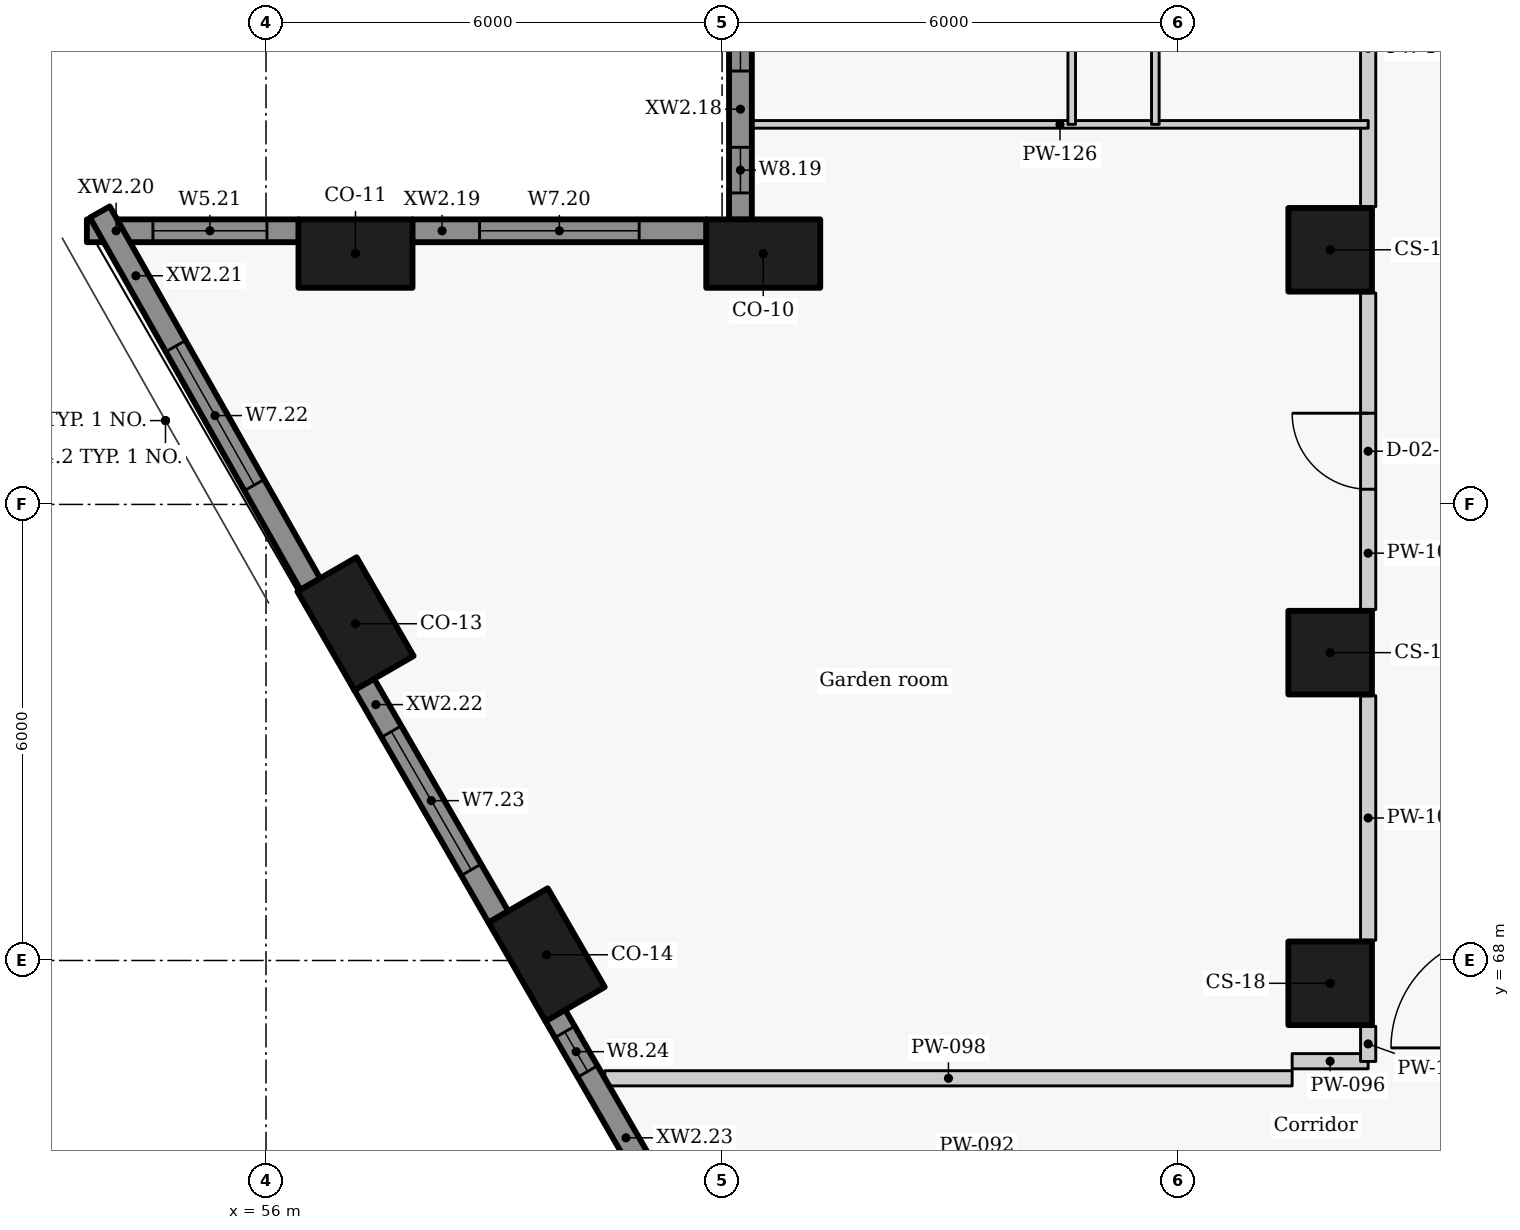
"""IFC4 building model, lengths in metres.
Left out: names, types, materials, properties, quantities, classifications, styles, units other than length and angle.
Written with IfcOpenShell. Run it as: python <this file> out.ifc"""

import sys

from ifc_helpers import new_model, si_unit, direction, frame, frame_2d, origin, origin_2d, place, context, subcontext, project, spatial, rectangle, extrude, element, fill, save


model = new_model("IFC4")
c1 = context("Model", 3, precision=1e-05, world=origin(), true_north=direction((0.0, 1.0)))
c2 = subcontext(c1, "Body", "Model", "MODEL_VIEW")
j1 = project(units=[si_unit("LENGTHUNIT", "METRE"), si_unit("PLANEANGLEUNIT", "RADIAN")], contexts=[c1])
p1 = place(None, origin())
s1 = spatial("IfcSite", under=j1, at=p1, CompositionType="ELEMENT")
p2 = place(p1, origin())
s2 = spatial("IfcBuilding", under=s1, at=p2, CompositionType="ELEMENT")
p3 = place(p2, frame((0.0, 0.0, 67.8)))
s3 = spatial("IfcBuildingStorey", under=s2, at=p3, CompositionType="ELEMENT", Elevation=67.8)
for number, where, z_axis, x_axis in (
    (1, (62.542, 77.3, 0.0), (0.0, 0.0, 1.0), (-1.0, 0.0, 0.0)),
    (2, (57.177, 77.3, 0.0), (0.0, 0.0, 1.0), (-1.0, 0.0, 0.0)),
    (3, (57.177, 72.43, 0.0), (0.0, 0.0, 1.0), (0.5, -0.866, 0.0)),
    (4, (59.692, 68.075, 0.0), (0.0, 0.0, 1.0), (0.5, -0.866, 0.0)),
):
    element("IfcColumn", number, at=place(p3, frame(where, z_axis=z_axis, x_axis=x_axis)), inside=s3, PredefinedType="COLUMN", context=c2, shape_type="SweptSolid", body=[
        extrude(rectangle(XDim=1.5, YDim=0.9, at=origin_2d()), origin(), (0.0, 0.0, 1.0), 3.3),
    ])
for number, where, z_axis, x_axis in (
    (5, (70.0, 77.35, 0.0), (0.0, 0.0, 1.0), (0.0, -1.0, 0.0)),
    (6, (70.0, 72.05, 0.0), (0.0, 0.0, 1.0), (0.0, -1.0, 0.0)),
    (7, (70.0, 67.7, 0.0), (0.0, 0.0, 1.0), (0.0, -1.0, 0.0)),
):
    element("IfcColumn", number, at=place(p3, frame(where, z_axis=z_axis, x_axis=x_axis)), inside=s3, PredefinedType="COLUMN", context=c2, shape_type="SweptSolid", body=[
        extrude(rectangle(XDim=1.1, YDim=1.1, at=origin_2d()), origin(), (0.0, 0.0, 1.0), 3.3),
    ])
p4 = place(p3, frame((62.242, 81.954, 0.0), z_axis=(0.0, 0.0, 1.0), x_axis=(0.0, -1.0, 0.0)))
e8 = element("IfcWall", 8, at=p4, inside=s3, PredefinedType="SOLIDWALL", context=c2, shape_type="SweptSolid", body=[
    extrude(rectangle(XDim=4.208, YDim=0.3, at=frame_2d((2.104, 0.0))), origin(), (0.0, 0.0, 1.0), 2.05),
])
p5 = place(p4, frame((0.752, 0.0, 0.9)))
e9 = element("IfcOpeningElement", 9, at=p5, cuts=e8, PredefinedType="OPENING", context=c2, shape_type="SweptSolid", body=[
    extrude(rectangle(XDim=1.5, YDim=1.1, at=frame_2d((0.75, 0.55))), frame((0.0, 0.16, 0.0), z_axis=(0.0, -1.0, 0.0), x_axis=(1.0, 0.0, 0.0)), (0.0, 0.0, 1.0), 0.32),
])
p6 = place(p4, frame((3.256, 0.0, 0.9)))
e10 = element("IfcOpeningElement", 10, at=p6, cuts=e8, PredefinedType="OPENING", context=c2, shape_type="SweptSolid", body=[
    extrude(rectangle(XDim=0.6, YDim=1.1, at=frame_2d((0.3, 0.55))), frame((0.0, 0.16, 0.0), z_axis=(0.0, -1.0, 0.0), x_axis=(1.0, 0.0, 0.0)), (0.0, 0.0, 1.0), 0.32),
])
p7 = place(p3, frame((61.796, 77.6, 0.0), z_axis=(0.0, 0.0, 1.0), x_axis=(-1.0, 0.0, 0.0)))
e11 = element("IfcWall", 11, at=p7, inside=s3, PredefinedType="SOLIDWALL", context=c2, shape_type="SweptSolid", body=[
    extrude(rectangle(XDim=3.873, YDim=0.3, at=frame_2d((1.936, 0.0))), origin(), (0.0, 0.0, 1.0), 2.05),
])
p8 = place(p7, frame((0.886, 0.0, 0.9)))
e12 = element("IfcOpeningElement", 12, at=p8, cuts=e11, PredefinedType="OPENING", context=c2, shape_type="SweptSolid", body=[
    extrude(rectangle(XDim=2.1, YDim=1.1, at=frame_2d((1.05, 0.55))), frame((0.0, 0.16, 0.0), z_axis=(0.0, -1.0, 0.0), x_axis=(1.0, 0.0, 0.0)), (0.0, 0.0, 1.0), 0.32),
])
p9 = place(p3, frame((56.431, 77.6, 0.0), z_axis=(0.0, 0.0, 1.0), x_axis=(-1.0, 0.0, 0.0)))
e13 = element("IfcWall", 13, at=p9, inside=s3, PredefinedType="SOLIDWALL", context=c2, shape_type="SweptSolid", body=[
    extrude(rectangle(XDim=2.788, YDim=0.3, at=frame_2d((1.394, 0.0))), origin(), (0.0, 0.0, 1.0), 2.05),
])
p10 = place(p9, frame((0.419, 0.0, 0.9)))
e14 = element("IfcOpeningElement", 14, at=p10, cuts=e13, PredefinedType="OPENING", context=c2, shape_type="SweptSolid", body=[
    extrude(rectangle(XDim=1.5, YDim=1.1, at=frame_2d((0.75, 0.55))), frame((0.0, 0.16, 0.0), z_axis=(0.0, -1.0, 0.0), x_axis=(1.0, 0.0, 0.0)), (0.0, 0.0, 1.0), 0.32),
])
p11 = place(p3, frame((53.814, 77.847, 0.0), z_axis=(0.0, 0.0, 1.0), x_axis=(0.492363204642, -0.870389840655, 0.0)))
e15 = element("IfcWall", 15, at=p11, inside=s3, PredefinedType="SOLIDWALL", context=c2, shape_type="SweptSolid", body=[
    extrude(rectangle(XDim=5.626, YDim=0.3, at=frame_2d((2.813, 0.0))), origin(), (0.0, 0.0, 1.0), 2.05),
])
p12 = place(p11, frame((2.026, 0.0, 0.9)))
e16 = element("IfcOpeningElement", 16, at=p12, cuts=e15, PredefinedType="OPENING", context=c2, shape_type="SweptSolid", body=[
    extrude(rectangle(XDim=2.1, YDim=1.1, at=frame_2d((1.05, 0.55))), frame((0.0, 0.16, 0.0), z_axis=(0.0, -1.0, 0.0), x_axis=(1.0, 0.0, 0.0)), (0.0, 0.0, 1.0), 0.32),
])
p13 = place(p3, frame((57.29, 71.634, 0.0), z_axis=(0.0, 0.0, 1.0), x_axis=(0.499977402622, -0.866038449993, 0.0)))
e17 = element("IfcWall", 17, at=p13, inside=s3, PredefinedType="SOLIDWALL", context=c2, shape_type="SweptSolid", body=[
    extrude(rectangle(XDim=3.537, YDim=0.3, at=frame_2d((1.769, 0.0))), origin(), (0.0, 0.0, 1.0), 2.05),
])
p14 = place(p13, frame((0.719, 0.0, 0.9)))
e18 = element("IfcOpeningElement", 18, at=p14, cuts=e17, PredefinedType="OPENING", context=c2, shape_type="SweptSolid", body=[
    extrude(rectangle(XDim=2.1, YDim=1.1, at=frame_2d((1.05, 0.55))), frame((0.0, 0.16, 0.0), z_axis=(0.0, -1.0, 0.0), x_axis=(1.0, 0.0, 0.0)), (0.0, 0.0, 1.0), 0.32),
])
p15 = place(p3, frame((59.805, 67.279, 0.0), z_axis=(0.0, 0.0, 1.0), x_axis=(0.500001735503, -0.866024401789, 0.0)))
e19 = element("IfcWall", 19, at=p15, inside=s3, PredefinedType="SOLIDWALL", context=c2, shape_type="SweptSolid", body=[
    extrude(rectangle(XDim=3.834, YDim=0.3, at=frame_2d((1.917, 0.0))), origin(), (0.0, 0.0, 1.0), 2.05),
])
p16 = place(p15, frame((0.253, 0.0, 0.9)))
e20 = element("IfcOpeningElement", 20, at=p16, cuts=e19, PredefinedType="OPENING", context=c2, shape_type="SweptSolid", body=[
    extrude(rectangle(XDim=0.6, YDim=1.1, at=frame_2d((0.3, 0.55))), frame((0.0, 0.16, 0.0), z_axis=(0.0, -1.0, 0.0), x_axis=(1.0, 0.0, 0.0)), (0.0, 0.0, 1.0), 0.32),
])
p17 = place(p15, frame((2.87, 0.0, 0.9)))
e21 = element("IfcOpeningElement", 21, at=p17, cuts=e19, PredefinedType="OPENING", context=c2, shape_type="SweptSolid", body=[
    extrude(rectangle(XDim=0.6, YDim=1.1, at=frame_2d((0.3, 0.55))), frame((0.0, 0.16, 0.0), z_axis=(0.0, -1.0, 0.0), x_axis=(1.0, 0.0, 0.0)), (0.0, 0.0, 1.0), 0.32),
])
p18 = place(p3, frame((69.5, 66.675, 0.0), z_axis=(0.0, 0.0, 1.0), x_axis=(1.0, 0.0, 0.0)))
e22 = element("IfcWall", 22, at=p18, inside=s3, PredefinedType="PARTITIONING", context=c2, shape_type="SweptSolid", body=[
    extrude(rectangle(XDim=1.0, YDim=0.2, at=frame_2d((0.5, 0.0))), origin(), (0.0, 0.0, 1.0), 2.43),
])
p19 = place(p3, frame((60.457, 66.45, 0.0), z_axis=(0.0, 0.0, 1.0), x_axis=(1.0, 0.0, 0.0)))
e23 = element("IfcWall", 23, at=p19, inside=s3, PredefinedType="PARTITIONING", context=c2, shape_type="SweptSolid", body=[
    extrude(rectangle(XDim=9.043, YDim=0.2, at=frame_2d((4.521, 0.0))), origin(), (0.0, 0.0, 1.0), 2.03),
])
p20 = place(p3, frame((70.5, 66.672, 0.0), z_axis=(0.0, 0.0, 1.0), x_axis=(0.0, 1.0, 0.0)))
e24 = element("IfcWall", 24, at=p20, inside=s3, PredefinedType="PARTITIONING", context=c2, shape_type="SweptSolid", body=[
    extrude(rectangle(XDim=0.461, YDim=0.2, at=frame_2d((0.23, 0.0))), origin(), (0.0, 0.0, 1.0), 2.95),
])
p21 = place(p3, frame((70.5, 68.267, 0.0), z_axis=(0.0, 0.0, 1.0), x_axis=(0.0, 1.0, 0.0)))
e25 = element("IfcWall", 25, at=p21, inside=s3, PredefinedType="PARTITIONING", context=c2, shape_type="SweptSolid", body=[
    extrude(rectangle(XDim=3.216, YDim=0.2, at=frame_2d((1.608, 0.0))), origin(), (0.0, 0.0, 1.0), 2.95),
])
p22 = place(p3, frame((70.5, 72.617, 0.0), z_axis=(0.0, 0.0, 1.0), x_axis=(0.0, 1.0, 0.0)))
e26 = element("IfcWall", 26, at=p22, inside=s3, PredefinedType="PARTITIONING", context=c2, shape_type="SweptSolid", body=[
    extrude(rectangle(XDim=4.166, YDim=0.2, at=frame_2d((2.083, 0.0))), origin(), (0.0, 0.0, 1.0), 2.95),
])
p23 = place(p22, frame((1.583, 0.0, 0.0)))
e27 = element("IfcOpeningElement", 27, at=p23, cuts=e26, PredefinedType="OPENING", context=c2, shape_type="SweptSolid", body=[
    extrude(rectangle(XDim=1.0, YDim=2.1, at=frame_2d((0.5, 1.05))), frame((0.0, 0.11, 0.0), z_axis=(0.0, -1.0, 0.0), x_axis=(1.0, 0.0, 0.0)), (0.0, 0.0, 1.0), 0.22),
])
p24 = place(p3, frame((70.5, 77.917, 0.0), z_axis=(0.0, 0.0, 1.0), x_axis=(0.0, 1.0, 0.0)))
e28 = element("IfcWall", 28, at=p24, inside=s3, PredefinedType="PARTITIONING", context=c2, shape_type="SweptSolid", body=[
    extrude(rectangle(XDim=4.166, YDim=0.2, at=frame_2d((2.083, 0.0))), origin(), (0.0, 0.0, 1.0), 2.95),
])
p25 = place(p3, frame((62.392, 79.0, 0.0), z_axis=(0.0, 0.0, 1.0), x_axis=(1.0, 0.0, 0.0)))
e29 = element("IfcWall", 29, at=p25, inside=s3, PredefinedType="PARTITIONING", context=c2, shape_type="SweptSolid", body=[
    extrude(rectangle(XDim=8.108, YDim=0.1, at=frame_2d((4.054, 0.0))), origin(), (0.0, 0.0, 1.0), 2.03),
])
p26 = place(p3, frame((67.7, 85.9, 0.0), z_axis=(0.0, 0.0, 1.0), x_axis=(0.0, -1.0, 0.0)))
e30 = element("IfcWall", 30, at=p26, inside=s3, PredefinedType="PARTITIONING", context=c2, shape_type="SweptSolid", body=[
    extrude(rectangle(XDim=6.9, YDim=0.1, at=frame_2d((3.45, 0.0))), origin(), (0.0, 0.0, 1.0), 2.95),
])
p27 = place(p26, frame((4.568, 0.0, 0.0)))
e31 = element("IfcOpeningElement", 31, at=p27, cuts=e30, PredefinedType="OPENING", context=c2, shape_type="SweptSolid", body=[
    extrude(rectangle(XDim=0.9, YDim=2.1, at=frame_2d((0.45, 1.05))), frame((0.0, 0.06, 0.0), z_axis=(0.0, -1.0, 0.0), x_axis=(1.0, 0.0, 0.0)), (0.0, 0.0, 1.0), 0.12),
])
p28 = place(p26, frame((1.143, 0.0, 0.0)))
e32 = element("IfcOpeningElement", 32, at=p28, cuts=e30, PredefinedType="OPENING", context=c2, shape_type="SweptSolid", body=[
    extrude(rectangle(XDim=0.85, YDim=2.1, at=frame_2d((0.425, 1.05))), frame((0.0, 0.06, 0.0), z_axis=(0.0, -1.0, 0.0), x_axis=(1.0, 0.0, 0.0)), (0.0, 0.0, 1.0), 0.12),
])
p29 = place(p3, frame((66.6, 79.0, 0.0), z_axis=(0.0, 0.0, 1.0), x_axis=(0.0, 1.0, 0.0)))
e33 = element("IfcWall", 33, at=p29, inside=s3, PredefinedType="PARTITIONING", context=c2, shape_type="SweptSolid", body=[
    extrude(rectangle(XDim=10.0, YDim=0.1, at=frame_2d((5.0, 0.0))), origin(), (0.0, 0.0, 1.0), 2.95),
])
p30 = place(p29, frame((1.002, 0.0, 0.0)))
e34 = element("IfcOpeningElement", 34, at=p30, cuts=e33, PredefinedType="OPENING", context=c2, shape_type="SweptSolid", body=[
    extrude(rectangle(XDim=0.9, YDim=2.1, at=frame_2d((0.45, 1.05))), frame((0.0, 0.06, 0.0), z_axis=(0.0, -1.0, 0.0), x_axis=(1.0, 0.0, 0.0)), (0.0, 0.0, 1.0), 0.12),
])
p31 = place(p29, frame((3.905, 0.0, 0.0)))
e35 = element("IfcOpeningElement", 35, at=p31, cuts=e33, PredefinedType="OPENING", context=c2, shape_type="SweptSolid", body=[
    extrude(rectangle(XDim=0.9, YDim=2.1, at=frame_2d((0.45, 1.05))), frame((0.0, 0.06, 0.0), z_axis=(0.0, -1.0, 0.0), x_axis=(1.0, 0.0, 0.0)), (0.0, 0.0, 1.0), 0.12),
])
p32 = place(p29, frame((7.453, 0.0, 0.0)))
e36 = element("IfcOpeningElement", 36, at=p32, cuts=e33, PredefinedType="OPENING", context=c2, shape_type="SweptSolid", body=[
    extrude(rectangle(XDim=0.9, YDim=2.1, at=frame_2d((0.45, 1.05))), frame((0.0, 0.06, 0.0), z_axis=(0.0, -1.0, 0.0), x_axis=(1.0, 0.0, 0.0)), (0.0, 0.0, 1.0), 0.12),
])
p33 = place(p5, origin())
e37 = element("IfcWindow", 37, at=p33, inside=s3, PartitioningType="SINGLE_PANEL", PredefinedType="WINDOW", context=c2, shape_type="SweptSolid", body=[
    extrude(rectangle(XDim=1.5, YDim=1.1, at=frame_2d((0.75, 0.55))), frame((0.0, 0.03, 0.0), z_axis=(0.0, -1.0, 0.0), x_axis=(1.0, 0.0, 0.0)), (0.0, 0.0, 1.0), 0.06),
])
fill(e9, e37)
p34 = place(p6, origin())
e38 = element("IfcWindow", 38, at=p34, inside=s3, PartitioningType="SINGLE_PANEL", PredefinedType="WINDOW", context=c2, shape_type="SweptSolid", body=[
    extrude(rectangle(XDim=0.6, YDim=1.1, at=frame_2d((0.3, 0.55))), frame((0.0, 0.03, 0.0), z_axis=(0.0, -1.0, 0.0), x_axis=(1.0, 0.0, 0.0)), (0.0, 0.0, 1.0), 0.06),
])
fill(e10, e38)
p35 = place(p8, origin())
e39 = element("IfcWindow", 39, at=p35, inside=s3, PartitioningType="SINGLE_PANEL", PredefinedType="WINDOW", context=c2, shape_type="SweptSolid", body=[
    extrude(rectangle(XDim=2.1, YDim=1.1, at=frame_2d((1.05, 0.55))), frame((0.0, 0.03, 0.0), z_axis=(0.0, -1.0, 0.0), x_axis=(1.0, 0.0, 0.0)), (0.0, 0.0, 1.0), 0.06),
])
fill(e12, e39)
p36 = place(p10, origin())
e40 = element("IfcWindow", 40, at=p36, inside=s3, PartitioningType="SINGLE_PANEL", PredefinedType="WINDOW", context=c2, shape_type="SweptSolid", body=[
    extrude(rectangle(XDim=1.5, YDim=1.1, at=frame_2d((0.75, 0.55))), frame((0.0, 0.03, 0.0), z_axis=(0.0, -1.0, 0.0), x_axis=(1.0, 0.0, 0.0)), (0.0, 0.0, 1.0), 0.06),
])
fill(e14, e40)
p37 = place(p12, origin())
e41 = element("IfcWindow", 41, at=p37, inside=s3, PartitioningType="SINGLE_PANEL", PredefinedType="WINDOW", context=c2, shape_type="SweptSolid", body=[
    extrude(rectangle(XDim=2.1, YDim=1.1, at=frame_2d((1.05, 0.55))), frame((0.0, 0.03, 0.0), z_axis=(0.0, -1.0, 0.0), x_axis=(1.0, 0.0, 0.0)), (0.0, 0.0, 1.0), 0.06),
])
fill(e16, e41)
p38 = place(p14, origin())
e42 = element("IfcWindow", 42, at=p38, inside=s3, PartitioningType="SINGLE_PANEL", PredefinedType="WINDOW", context=c2, shape_type="SweptSolid", body=[
    extrude(rectangle(XDim=2.1, YDim=1.1, at=frame_2d((1.05, 0.55))), frame((0.0, 0.03, 0.0), z_axis=(0.0, -1.0, 0.0), x_axis=(1.0, 0.0, 0.0)), (0.0, 0.0, 1.0), 0.06),
])
fill(e18, e42)
p39 = place(p16, origin())
e43 = element("IfcWindow", 43, at=p39, inside=s3, PartitioningType="SINGLE_PANEL", PredefinedType="WINDOW", context=c2, shape_type="SweptSolid", body=[
    extrude(rectangle(XDim=0.6, YDim=1.1, at=frame_2d((0.3, 0.55))), frame((0.0, 0.03, 0.0), z_axis=(0.0, -1.0, 0.0), x_axis=(1.0, 0.0, 0.0)), (0.0, 0.0, 1.0), 0.06),
])
fill(e20, e43)
p40 = place(p23, origin())
e44 = element("IfcDoor", 44, at=p40, inside=s3, OperationType="SINGLE_SWING_RIGHT", PredefinedType="DOOR", context=c2, shape_type="SweptSolid", body=[
    extrude(rectangle(XDim=1.0, YDim=2.1, at=frame_2d((0.5, 1.05))), frame((0.0, 0.025, 0.0), z_axis=(0.0, -1.0, 0.0), x_axis=(1.0, 0.0, 0.0)), (0.0, 0.0, 1.0), 0.05),
])
fill(e27, e44)
save(model, sys.argv[1])
